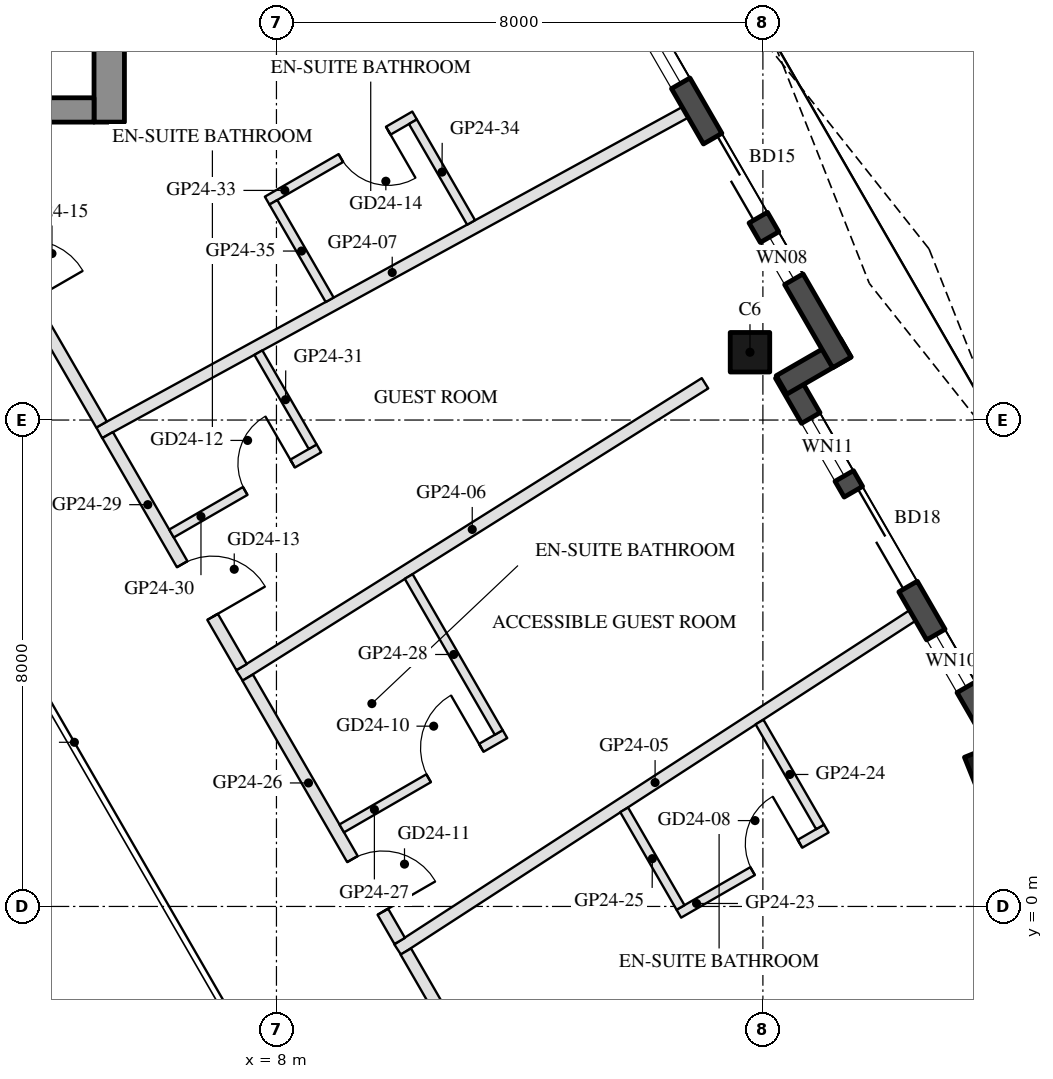
"""IFC4 building model, lengths in metres.
Left out: names, types, materials, properties, quantities, classifications, styles, units other than length and angle.
Written with IfcOpenShell. Run it as: python <this file> out.ifc"""

import sys

from ifc_helpers import new_model, si_unit, direction, frame, frame_2d, origin, origin_2d, place, context, subcontext, project, spatial, rectangle, hollow_rectangle, extrude, boolean, halfspace, element, fill, save


model = new_model("IFC4")
c1 = context("Model", 3, precision=1e-05, world=origin(), true_north=direction((0.0, 1.0)))
c2 = subcontext(c1, "Body", "Model", "MODEL_VIEW")
j1 = project(units=[si_unit("LENGTHUNIT", "METRE"), si_unit("PLANEANGLEUNIT", "RADIAN")], contexts=[c1])
p1 = place(None, origin())
s1 = spatial("IfcSite", under=j1, at=p1, CompositionType="ELEMENT")
p2 = place(p1, origin())
s2 = spatial("IfcBuilding", under=s1, at=p2, CompositionType="ELEMENT")
p3 = place(p2, frame((0.0, 0.0, 254.1)))
s3 = spatial("IfcBuildingStorey", under=s2, at=p3, CompositionType="ELEMENT", Elevation=254.1)
p4 = place(p3, frame((19.738, 2.273, 0.0), z_axis=(-0.161388519526, -0.022915997932, 0.986624854139), x_axis=(0.495109873729, -0.866696335889, 0.060857820306)))
e1 = element("IfcColumn", 1, at=p4, inside=s3, PredefinedType="COLUMN", context=c2, shape_type="SweptSolid", body=[
    boolean("DIFFERENCE", boolean("DIFFERENCE", extrude(hollow_rectangle(XDim=0.65, YDim=0.65, WallThickness=0.03, at=origin_2d()), origin(), (0.0, 0.0, 1.0), 3.75), halfspace(frame((0.0, 0.0, 0.04), z_axis=(0.0, 0.0, 1.0), x_axis=(1.0, 0.0, 0.0)), True)), halfspace(frame((0.0, 0.0, 3.71), z_axis=(0.0, 0.0, 1.0), x_axis=(1.0, 0.0, 0.0)), False)),
])
p5 = place(p3, frame((15.788, 9.115, 0.0), z_axis=(-0.131228839908, -0.075723997581, 0.988455799602), x_axis=(0.499841813697, -0.866116713392, 7.933019e-06)))
e2 = element("IfcColumn", 2, at=p5, inside=s3, PredefinedType="COLUMN", context=c2, shape_type="SweptSolid", body=[
    boolean("DIFFERENCE", boolean("DIFFERENCE", extrude(hollow_rectangle(XDim=0.65, YDim=0.65, WallThickness=0.03, at=origin_2d()), origin(), (0.0, 0.0, 1.0), 3.743), halfspace(frame((0.0, 0.0, 0.037), z_axis=(0.0, 0.0, 1.0), x_axis=(1.0, 0.0, 0.0)), True)), halfspace(frame((0.0, 0.0, 3.706), z_axis=(0.0, 0.0, 1.0), x_axis=(1.0, 0.0, 0.0)), False)),
])
p6 = place(p3, frame((20.588, 3.601, 0.0), z_axis=(0.0, 0.0, 1.0), x_axis=(-0.866005645448, -0.500034220881, 0.0)))
e3 = element("IfcWall", 3, at=p6, inside=s3, PredefinedType="SOLIDWALL", context=c2, shape_type="SweptSolid", body=[
    extrude(rectangle(XDim=1.22, YDim=0.35, at=frame_2d((0.61, 0.0))), origin(), (0.0, 0.0, 1.0), 3.55),
])
p7 = place(p3, frame((19.729, 2.938, 0.0), z_axis=(0.0, 0.0, 1.0), x_axis=(-0.499976430342, 0.866039011305, 0.0)))
e4 = element("IfcWall", 4, at=p7, inside=s3, PredefinedType="SOLIDWALL", context=c2, shape_type="SweptSolid", body=[
    extrude(rectangle(XDim=6.74, YDim=0.35, at=frame_2d((3.37, 0.0))), origin(), (0.0, 0.0, 1.0), 3.55),
])
p8 = place(p7, frame((0.77, 0.0, 0.3)))
e5 = element("IfcOpeningElement", 5, at=p8, cuts=e4, PredefinedType="OPENING", context=c2, shape_type="SweptSolid", body=[
    extrude(rectangle(XDim=1.0, YDim=2.65, at=frame_2d((0.5, 1.325))), frame((0.0, 0.185, 0.0), z_axis=(0.0, -1.0, 0.0), x_axis=(1.0, 0.0, 0.0)), (0.0, 0.0, 1.0), 0.37),
])
p9 = place(p7, frame((2.683, 0.0, 0.0)))
e6 = element("IfcOpeningElement", 6, at=p9, cuts=e4, PredefinedType="OPENING", context=c2, shape_type="SweptSolid", body=[
    extrude(rectangle(XDim=1.8, YDim=2.4, at=frame_2d((0.9, 1.2))), frame((0.0, 0.185, 0.0), z_axis=(0.0, -1.0, 0.0), x_axis=(1.0, 0.0, 0.0)), (0.0, 0.0, 1.0), 0.37),
])
p10 = place(p7, frame((4.783, 0.0, 0.3)))
e7 = element("IfcOpeningElement", 7, at=p10, cuts=e4, PredefinedType="OPENING", context=c2, shape_type="SweptSolid", body=[
    extrude(rectangle(XDim=1.1, YDim=2.65, at=frame_2d((0.55, 1.325))), frame((0.0, 0.185, 0.0), z_axis=(0.0, -1.0, 0.0), x_axis=(1.0, 0.0, 0.0)), (0.0, 0.0, 1.0), 0.37),
])
p11 = place(p3, frame((16.306, 8.577, 0.0), z_axis=(0.0, 0.0, 1.0), x_axis=(0.866092288191, 0.499884134912, 0.0)))
e8 = element("IfcWall", 8, at=p11, inside=s3, PredefinedType="SOLIDWALL", context=c2, shape_type="SweptSolid", body=[
    extrude(rectangle(XDim=1.22, YDim=0.35, at=frame_2d((0.61, 0.0))), origin(), (0.0, 0.0, 1.0), 3.55),
])
p12 = place(p3, frame((17.299, 8.948, 0.0), z_axis=(0.0, 0.0, 1.0), x_axis=(-0.500010041276, 0.866019606374, 0.0)))
e9 = element("IfcWall", 9, at=p12, inside=s3, PredefinedType="SOLIDWALL", context=c2, shape_type="SweptSolid", body=[
    extrude(rectangle(XDim=9.7, YDim=0.35, at=frame_2d((4.85, 0.0))), origin(), (0.0, 0.0, 1.0), 3.55),
])
p13 = place(p12, frame((2.749, 0.0, 0.0)))
e10 = element("IfcOpeningElement", 10, at=p13, cuts=e9, PredefinedType="OPENING", context=c2, shape_type="SweptSolid", body=[
    extrude(rectangle(XDim=1.5, YDim=2.4, at=frame_2d((0.75, 1.2))), frame((0.0, 0.185, 0.0), z_axis=(0.0, -1.0, 0.0), x_axis=(1.0, 0.0, 0.0)), (0.0, 0.0, 1.0), 0.37),
])
p14 = place(p12, frame((1.579, 0.0, 0.3)))
e11 = element("IfcOpeningElement", 11, at=p14, cuts=e9, PredefinedType="OPENING", context=c2, shape_type="SweptSolid", body=[
    extrude(rectangle(XDim=0.8, YDim=2.65, at=frame_2d((0.4, 1.325))), frame((0.0, 0.185, 0.0), z_axis=(0.0, -1.0, 0.0), x_axis=(1.0, 0.0, 0.0)), (0.0, 0.0, 1.0), 0.37),
])
p15 = place(p12, frame((5.3, 0.0, 0.3)))
e12 = element("IfcOpeningElement", 12, at=p15, cuts=e9, PredefinedType="OPENING", context=c2, shape_type="SweptSolid", body=[
    extrude(rectangle(XDim=2.5, YDim=2.65, at=frame_2d((1.25, 1.325))), frame((0.0, 0.185, 0.0), z_axis=(0.0, -1.0, 0.0), x_axis=(1.0, 0.0, 0.0)), (0.0, 0.0, 1.0), 0.37),
])
p16 = place(p3, frame((5.25, 12.9, 0.0), z_axis=(0.0, 0.0, 1.0), x_axis=(0.0, 1.0, 0.0)))
e13 = element("IfcWall", 13, at=p16, inside=s3, PredefinedType="SHEAR", context=c2, shape_type="SweptSolid", body=[
    extrude(rectangle(XDim=14.837, YDim=0.5, at=frame_2d((7.418, 0.0))), origin(), (0.0, 0.0, 1.0), 3.5),
])
p17 = place(p3, frame((5.0, 13.1, 0.0), z_axis=(0.0, 0.0, 1.0), x_axis=(-1.0, 0.0, 0.0)))
e14 = element("IfcWall", 14, at=p17, inside=s3, PredefinedType="SHEAR", context=c2, shape_type="SweptSolid", body=[
    extrude(rectangle(XDim=10.0, YDim=0.4, at=frame_2d((5.0, 0.0))), origin(), (0.0, 0.0, 1.0), 3.5),
])
p18 = place(p17, frame((3.55, 0.0, 0.0)))
e15 = element("IfcOpeningElement", 15, at=p18, cuts=e14, PredefinedType="OPENING", context=c2, shape_type="SweptSolid", body=[
    extrude(rectangle(XDim=1.1, YDim=2.1, at=frame_2d((0.55, 1.05))), frame((0.0, 0.21, 0.0), z_axis=(0.0, -1.0, 0.0), x_axis=(1.0, 0.0, 0.0)), (0.0, 0.0, 1.0), 0.42),
])
p19 = place(p17, frame((5.85, 0.0, 0.0)))
e16 = element("IfcOpeningElement", 16, at=p19, cuts=e14, PredefinedType="OPENING", context=c2, shape_type="SweptSolid", body=[
    extrude(rectangle(XDim=1.4, YDim=2.1, at=frame_2d((0.7, 1.05))), frame((0.0, 0.21, 0.0), z_axis=(0.0, -1.0, 0.0), x_axis=(1.0, 0.0, 0.0)), (0.0, 0.0, 1.0), 0.42),
])
p20 = place(p3, frame((18.461, 4.785, 0.0), z_axis=(0.0, 0.0, 1.0), x_axis=(-0.838914127868, -0.544263801905, 0.0)))
e17 = element("IfcWall", 17, at=p20, inside=s3, PredefinedType="PARTITIONING", context=c2, shape_type="SweptSolid", body=[
    extrude(rectangle(XDim=10.094, YDim=0.2, at=frame_2d((5.047, 0.0))), origin(), (0.0, 0.0, 1.0), 3.1),
])
p21 = place(p3, frame((15.048, 8.604, 0.0), z_axis=(0.0, 0.0, 1.0), x_axis=(-0.846891968691, -0.531764979448, 0.0)))
e18 = element("IfcWall", 18, at=p21, inside=s3, PredefinedType="PARTITIONING", context=c2, shape_type="SweptSolid", body=[
    extrude(rectangle(XDim=9.041, YDim=0.2, at=frame_2d((4.52, 0.0))), origin(), (0.0, 0.0, 1.0), 3.0),
])
p22 = place(p3, frame((14.722, 13.061, 0.0), z_axis=(0.0, 0.0, 1.0), x_axis=(-0.87738195935, -0.479792556641, 0.0)))
e19 = element("IfcWall", 19, at=p22, inside=s3, PredefinedType="PARTITIONING", context=c2, shape_type="SweptSolid", body=[
    extrude(rectangle(XDim=10.983, YDim=0.2, at=frame_2d((5.491, 0.0))), origin(), (0.0, 0.0, 1.0), 3.0),
])
p23 = place(p3, frame((10.127, -0.741, 0.0), z_axis=(0.0, 0.0, 1.0), x_axis=(0.500038251005, -0.86600331843, 0.0)))
e20 = element("IfcWall", 20, at=p23, inside=s3, PredefinedType="PARTITIONING", context=c2, shape_type="SweptSolid", body=[
    extrude(rectangle(XDim=4.283, YDim=0.2, at=frame_2d((2.142, 0.0))), origin(), (0.0, 0.0, 1.0), 3.0),
])
p24 = place(p23, frame((1.641, 0.0, 0.0)))
e21 = element("IfcOpeningElement", 21, at=p24, cuts=e20, PredefinedType="OPENING", context=c2, shape_type="SweptSolid", body=[
    extrude(rectangle(XDim=1.0, YDim=2.1, at=frame_2d((0.5, 1.05))), frame((0.0, 0.11, 0.0), z_axis=(0.0, -1.0, 0.0), x_axis=(1.0, 0.0, 0.0)), (0.0, 0.0, 1.0), 0.22),
])
p25 = place(p3, frame((14.618, -0.119, 0.0), z_axis=(0.0, 0.0, 1.0), x_axis=(0.866018616679, 0.500011755427, 0.0)))
e22 = element("IfcWall", 22, at=p25, inside=s3, PredefinedType="PARTITIONING", context=c2, shape_type="SweptSolid", body=[
    extrude(rectangle(XDim=2.8, YDim=0.15, at=frame_2d((1.4, 0.0))), origin(), (0.0, 0.0, 1.0), 3.55),
])
p26 = place(p25, frame((1.4, 0.0, 0.0)))
e23 = element("IfcOpeningElement", 23, at=p26, cuts=e22, PredefinedType="OPENING", context=c2, shape_type="SweptSolid", body=[
    extrude(rectangle(XDim=0.9, YDim=2.1, at=frame_2d((0.45, 1.05))), frame((0.0, 0.085, 0.0), z_axis=(0.0, -1.0, 0.0), x_axis=(1.0, 0.0, 0.0)), (0.0, 0.0, 1.0), 0.17),
])
p27 = place(p3, frame((16.94, 1.308, 0.0), z_axis=(0.0, 0.0, 1.0), x_axis=(-0.500001870701, 0.866024323732, 0.0)))
e24 = element("IfcWall", 24, at=p27, inside=s3, PredefinedType="PARTITIONING", context=c2, shape_type="SweptSolid", body=[
    extrude(rectangle(XDim=1.992, YDim=0.15, at=frame_2d((0.996, 0.0))), origin(), (0.0, 0.0, 1.0), 3.55),
])
p28 = place(p3, frame((14.646, -0.017, 0.0), z_axis=(0.0, 0.0, 1.0), x_axis=(-0.500034038322, 0.866005750858, 0.0)))
e25 = element("IfcWall", 25, at=p28, inside=s3, PredefinedType="PARTITIONING", context=c2, shape_type="SweptSolid", body=[
    extrude(rectangle(XDim=1.854, YDim=0.15, at=frame_2d((0.927, 0.0))), origin(), (0.0, 0.0, 1.0), 3.55),
])
p29 = place(p3, frame((7.527, 3.764, 0.0), z_axis=(0.0, 0.0, 1.0), x_axis=(0.499992905202, -0.866029499929, 0.0)))
e26 = element("IfcWall", 26, at=p29, inside=s3, PredefinedType="PARTITIONING", context=c2, shape_type="SweptSolid", body=[
    extrude(rectangle(XDim=5.001, YDim=0.2, at=frame_2d((2.5, 0.0))), origin(), (0.0, 0.0, 1.0), 3.0),
])
p30 = place(p29, frame((3.446, 0.0, 0.0)))
e27 = element("IfcOpeningElement", 27, at=p30, cuts=e26, PredefinedType="OPENING", context=c2, shape_type="SweptSolid", body=[
    extrude(rectangle(XDim=1.0, YDim=2.1, at=frame_2d((0.5, 1.05))), frame((0.0, 0.11, 0.0), z_axis=(0.0, -1.0, 0.0), x_axis=(1.0, 0.0, 0.0)), (0.0, 0.0, 1.0), 0.22),
])
p31 = place(p3, frame((9.074, 1.284, 0.0), z_axis=(0.0, 0.0, 1.0), x_axis=(0.86600983753, 0.500026960575, 0.0)))
e28 = element("IfcWall", 28, at=p31, inside=s3, PredefinedType="PARTITIONING", context=c2, shape_type="SweptSolid", body=[
    extrude(rectangle(XDim=3.1, YDim=0.15, at=frame_2d((1.55, 0.0))), origin(), (0.0, 0.0, 1.0), 3.55),
])
p32 = place(p31, frame((1.65, 0.0, 0.0)))
e29 = element("IfcOpeningElement", 29, at=p32, cuts=e28, PredefinedType="OPENING", context=c2, shape_type="SweptSolid", body=[
    extrude(rectangle(XDim=1.0, YDim=2.1, at=frame_2d((0.5, 1.05))), frame((0.0, 0.085, 0.0), z_axis=(0.0, -1.0, 0.0), x_axis=(1.0, 0.0, 0.0)), (0.0, 0.0, 1.0), 0.17),
])
p33 = place(p3, frame((11.656, 2.861, 0.0), z_axis=(0.0, 0.0, 1.0), x_axis=(-0.500048260122, 0.865997538997, 0.0)))
e30 = element("IfcWall", 30, at=p33, inside=s3, PredefinedType="PARTITIONING", context=c2, shape_type="SweptSolid", body=[
    extrude(rectangle(XDim=2.962, YDim=0.15, at=frame_2d((1.481, 0.0))), origin(), (0.0, 0.0, 1.0), 3.55),
])
p34 = place(p3, frame((5.223, 7.753, 0.0), z_axis=(0.0, 0.0, 1.0), x_axis=(0.500024628788, -0.86601118388, 0.0)))
e31 = element("IfcWall", 31, at=p34, inside=s3, PredefinedType="PARTITIONING", context=c2, shape_type="SweptSolid", body=[
    extrude(rectangle(XDim=4.406, YDim=0.2, at=frame_2d((2.203, 0.0))), origin(), (0.0, 0.0, 1.0), 3.0),
])
p35 = place(p34, frame((2.452, 0.0, 0.0)))
e32 = element("IfcOpeningElement", 32, at=p35, cuts=e31, PredefinedType="OPENING", context=c2, shape_type="SweptSolid", body=[
    extrude(rectangle(XDim=1.0, YDim=2.1, at=frame_2d((0.5, 1.05))), frame((0.0, 0.11, 0.0), z_axis=(0.0, -1.0, 0.0), x_axis=(1.0, 0.0, 0.0)), (0.0, 0.0, 1.0), 0.22),
])
p36 = place(p3, frame((6.274, 6.134, 0.0), z_axis=(0.0, 0.0, 1.0), x_axis=(0.865996816683, 0.500049511043, 0.0)))
e33 = element("IfcWall", 33, at=p36, inside=s3, PredefinedType="PARTITIONING", context=c2, shape_type="SweptSolid", body=[
    extrude(rectangle(XDim=2.8, YDim=0.15, at=frame_2d((1.4, 0.0))), origin(), (0.0, 0.0, 1.0), 3.55),
])
p37 = place(p36, frame((1.4, 0.0, 0.0)))
e34 = element("IfcOpeningElement", 34, at=p37, cuts=e33, PredefinedType="OPENING", context=c2, shape_type="SweptSolid", body=[
    extrude(rectangle(XDim=0.9, YDim=2.1, at=frame_2d((0.45, 1.05))), frame((0.0, 0.085, 0.0), z_axis=(0.0, -1.0, 0.0), x_axis=(1.0, 0.0, 0.0)), (0.0, 0.0, 1.0), 0.17),
])
p38 = place(p3, frame((8.596, 7.561, 0.0), z_axis=(0.0, 0.0, 1.0), x_axis=(-0.500077263419, 0.865980791133, 0.0)))
e35 = element("IfcWall", 35, at=p38, inside=s3, PredefinedType="PARTITIONING", context=c2, shape_type="SweptSolid", body=[
    extrude(rectangle(XDim=1.787, YDim=0.15, at=frame_2d((0.894, 0.0))), origin(), (0.0, 0.0, 1.0), 3.0),
])
p39 = place(p3, frame((2.281, 12.85, 0.0), z_axis=(0.0, 0.0, 1.0), x_axis=(0.499962807305, -0.866046875932, 0.0)))
e36 = element("IfcWall", 36, at=p39, inside=s3, PredefinedType="PARTITIONING", context=c2, shape_type="SweptSolid", body=[
    extrude(rectangle(XDim=5.686, YDim=0.2, at=frame_2d((2.843, 0.0))), origin(), (0.0, 0.0, 1.0), 3.0),
])
p40 = place(p39, frame((2.343, 0.0, 0.0)))
e37 = element("IfcOpeningElement", 37, at=p40, cuts=e36, PredefinedType="OPENING", context=c2, shape_type="SweptSolid", body=[
    extrude(rectangle(XDim=1.0, YDim=2.1, at=frame_2d((0.5, 1.05))), frame((0.0, 0.11, 0.0), z_axis=(0.0, -1.0, 0.0), x_axis=(1.0, 0.0, 0.0)), (0.0, 0.0, 1.0), 0.22),
])
p41 = place(p3, frame((10.272, 13.009, 0.0), z_axis=(0.0, 0.0, 1.0), x_axis=(-0.865996816683, -0.500049511043, 0.0)))
e38 = element("IfcWall", 38, at=p41, inside=s3, PredefinedType="PARTITIONING", context=c2, shape_type="SweptSolid", body=[
    extrude(rectangle(XDim=2.8, YDim=0.15, at=frame_2d((1.4, 0.0))), origin(), (0.0, 0.0, 1.0), 3.55),
])
p42 = place(p41, frame((0.5, 0.0, 0.0)))
e39 = element("IfcOpeningElement", 39, at=p42, cuts=e38, PredefinedType="OPENING", context=c2, shape_type="SweptSolid", body=[
    extrude(rectangle(XDim=0.9, YDim=2.1, at=frame_2d((0.45, 1.05))), frame((0.0, 0.085, 0.0), z_axis=(0.0, -1.0, 0.0), x_axis=(1.0, 0.0, 0.0)), (0.0, 0.0, 1.0), 0.17),
])
p43 = place(p3, frame((11.201, 11.25, 0.0), z_axis=(0.0, 0.0, 1.0), x_axis=(-0.500009674092, 0.866019818373, 0.0)))
e40 = element("IfcWall", 40, at=p43, inside=s3, PredefinedType="PARTITIONING", context=c2, shape_type="SweptSolid", body=[
    extrude(rectangle(XDim=1.913, YDim=0.15, at=frame_2d((0.957, 0.0))), origin(), (0.0, 0.0, 1.0), 3.55),
])
p44 = place(p3, frame((8.875, 9.978, 0.0), z_axis=(0.0, 0.0, 1.0), x_axis=(-0.499939294285, 0.866060449409, 0.0)))
e41 = element("IfcWall", 41, at=p44, inside=s3, PredefinedType="PARTITIONING", context=c2, shape_type="SweptSolid", body=[
    extrude(rectangle(XDim=1.852, YDim=0.15, at=frame_2d((0.926, 0.0))), origin(), (0.0, 0.0, 1.0), 3.55),
])
p45 = place(p8, origin())
e42 = element("IfcWindow", 42, at=p45, inside=s3, PartitioningType="SINGLE_PANEL", PredefinedType="WINDOW", context=c2, shape_type="SweptSolid", body=[
    extrude(rectangle(XDim=1.0, YDim=2.65, at=frame_2d((0.5, 1.325))), frame((0.0, 0.03, 0.0), z_axis=(0.0, -1.0, 0.0), x_axis=(1.0, 0.0, 0.0)), (0.0, 0.0, 1.0), 0.06),
])
fill(e5, e42)
p46 = place(p9, frame((1.8, 0.0, 0.0), z_axis=(0.0, 0.0, 1.0), x_axis=(-1.0, 0.0, 0.0)))
e43 = element("IfcDoor", 43, at=p46, inside=s3, OperationType="SLIDING_TO_LEFT", PredefinedType="DOOR", context=c2, shape_type="SweptSolid", body=[
    extrude(rectangle(XDim=1.8, YDim=2.4, at=frame_2d((0.9, 1.2))), frame((0.0, 0.025, 0.0), z_axis=(0.0, -1.0, 0.0), x_axis=(1.0, 0.0, 0.0)), (0.0, 0.0, 1.0), 0.05),
])
fill(e6, e43)
p47 = place(p10, origin())
e44 = element("IfcWindow", 44, at=p47, inside=s3, PartitioningType="SINGLE_PANEL", PredefinedType="WINDOW", context=c2, shape_type="SweptSolid", body=[
    extrude(rectangle(XDim=1.1, YDim=2.65, at=frame_2d((0.55, 1.325))), frame((0.0, 0.03, 0.0), z_axis=(0.0, -1.0, 0.0), x_axis=(1.0, 0.0, 0.0)), (0.0, 0.0, 1.0), 0.06),
])
fill(e7, e44)
p48 = place(p13, frame((1.5, 0.0, 0.0), z_axis=(0.0, 0.0, 1.0), x_axis=(-1.0, 0.0, 0.0)))
e45 = element("IfcDoor", 45, at=p48, inside=s3, OperationType="SLIDING_TO_LEFT", PredefinedType="DOOR", context=c2, shape_type="SweptSolid", body=[
    extrude(rectangle(XDim=1.5, YDim=2.4, at=frame_2d((0.75, 1.2))), frame((0.0, 0.025, 0.0), z_axis=(0.0, -1.0, 0.0), x_axis=(1.0, 0.0, 0.0)), (0.0, 0.0, 1.0), 0.05),
])
fill(e10, e45)
p49 = place(p14, origin())
e46 = element("IfcWindow", 46, at=p49, inside=s3, PartitioningType="SINGLE_PANEL", PredefinedType="WINDOW", context=c2, shape_type="SweptSolid", body=[
    extrude(rectangle(XDim=0.8, YDim=2.65, at=frame_2d((0.4, 1.325))), frame((0.0, 0.03, 0.0), z_axis=(0.0, -1.0, 0.0), x_axis=(1.0, 0.0, 0.0)), (0.0, 0.0, 1.0), 0.06),
])
fill(e11, e46)
p50 = place(p15, origin())
e47 = element("IfcWindow", 47, at=p50, inside=s3, PartitioningType="SINGLE_PANEL", PredefinedType="WINDOW", context=c2, shape_type="SweptSolid", body=[
    extrude(rectangle(XDim=2.5, YDim=2.65, at=frame_2d((1.25, 1.325))), frame((0.0, 0.03, 0.0), z_axis=(0.0, -1.0, 0.0), x_axis=(1.0, 0.0, 0.0)), (0.0, 0.0, 1.0), 0.06),
])
fill(e12, e47)
p51 = place(p26, origin())
e48 = element("IfcDoor", 48, at=p51, inside=s3, OperationType="SINGLE_SWING_RIGHT", PredefinedType="DOOR", context=c2, shape_type="SweptSolid", body=[
    extrude(rectangle(XDim=0.9, YDim=2.1, at=frame_2d((0.45, 1.05))), frame((0.0, 0.025, 0.0), z_axis=(0.0, -1.0, 0.0), x_axis=(1.0, 0.0, 0.0)), (0.0, 0.0, 1.0), 0.05),
])
fill(e23, e48)
p52 = place(p32, origin())
e49 = element("IfcDoor", 49, at=p52, inside=s3, OperationType="SINGLE_SWING_RIGHT", PredefinedType="DOOR", context=c2, shape_type="SweptSolid", body=[
    extrude(rectangle(XDim=1.0, YDim=2.1, at=frame_2d((0.5, 1.05))), frame((0.0, 0.025, 0.0), z_axis=(0.0, -1.0, 0.0), x_axis=(1.0, 0.0, 0.0)), (0.0, 0.0, 1.0), 0.05),
])
fill(e29, e49)
p53 = place(p30, origin())
e50 = element("IfcDoor", 50, at=p53, inside=s3, OperationType="SINGLE_SWING_RIGHT", PredefinedType="DOOR", context=c2, shape_type="SweptSolid", body=[
    extrude(rectangle(XDim=1.0, YDim=2.1, at=frame_2d((0.5, 1.05))), frame((0.0, 0.025, 0.0), z_axis=(0.0, -1.0, 0.0), x_axis=(1.0, 0.0, 0.0)), (0.0, 0.0, 1.0), 0.05),
])
fill(e27, e50)
p54 = place(p37, origin())
e51 = element("IfcDoor", 51, at=p54, inside=s3, OperationType="SINGLE_SWING_RIGHT", PredefinedType="DOOR", context=c2, shape_type="SweptSolid", body=[
    extrude(rectangle(XDim=0.9, YDim=2.1, at=frame_2d((0.45, 1.05))), frame((0.0, 0.025, 0.0), z_axis=(0.0, -1.0, 0.0), x_axis=(1.0, 0.0, 0.0)), (0.0, 0.0, 1.0), 0.05),
])
fill(e34, e51)
p55 = place(p35, origin())
e52 = element("IfcDoor", 52, at=p55, inside=s3, OperationType="SINGLE_SWING_RIGHT", PredefinedType="DOOR", context=c2, shape_type="SweptSolid", body=[
    extrude(rectangle(XDim=1.0, YDim=2.1, at=frame_2d((0.5, 1.05))), frame((0.0, 0.025, 0.0), z_axis=(0.0, -1.0, 0.0), x_axis=(1.0, 0.0, 0.0)), (0.0, 0.0, 1.0), 0.05),
])
fill(e32, e52)
p56 = place(p42, origin())
e53 = element("IfcDoor", 53, at=p56, inside=s3, OperationType="SINGLE_SWING_LEFT", PredefinedType="DOOR", context=c2, shape_type="SweptSolid", body=[
    extrude(rectangle(XDim=0.9, YDim=2.1, at=frame_2d((0.45, 1.05))), frame((0.0, 0.025, 0.0), z_axis=(0.0, -1.0, 0.0), x_axis=(1.0, 0.0, 0.0)), (0.0, 0.0, 1.0), 0.05),
])
fill(e39, e53)
save(model, sys.argv[1])
